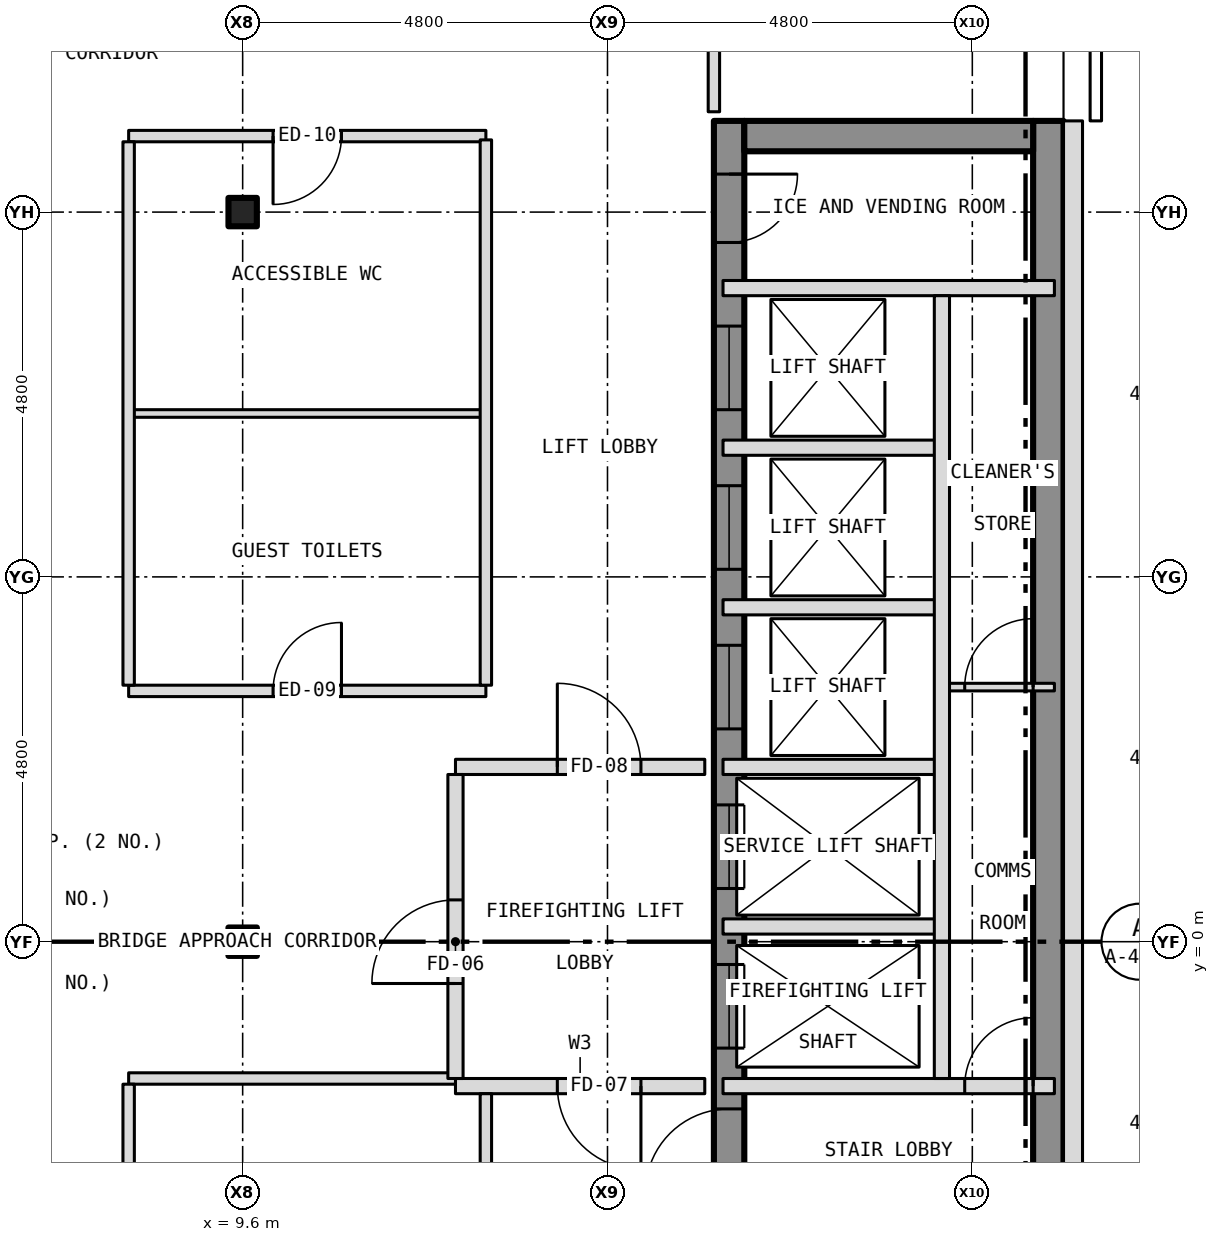
"""IFC4 building model, lengths in metres.
Left out: names, types, materials, properties, quantities, classifications, styles, units other than length and angle.
Written with IfcOpenShell. Run it as: python <this file> out.ifc"""

import sys

from ifc_helpers import new_model, si_unit, direction, frame, frame_2d, origin, origin_2d, place, context, subcontext, project, spatial, rectangle, i_section, extrude, element, fill, save


model = new_model("IFC4")
c1 = context("Model", 3, precision=1e-05, world=origin(), true_north=direction((0.0, 1.0)))
c2 = subcontext(c1, "Body", "Model", "MODEL_VIEW")
j1 = project(units=[si_unit("LENGTHUNIT", "METRE"), si_unit("PLANEANGLEUNIT", "RADIAN")], contexts=[c1])
p1 = place(None, origin())
s1 = spatial("IfcSite", under=j1, at=p1, CompositionType="ELEMENT")
p2 = place(p1, origin())
s2 = spatial("IfcBuilding", under=s1, at=p2, CompositionType="ELEMENT")
p3 = place(p2, frame((0.0, 0.0, 226.0)))
s3 = spatial("IfcBuildingStorey", under=s2, at=p3, CompositionType="ELEMENT", Elevation=226.0)
for number, where, z_axis, x_axis in (
    (1, (9.6, 0.0, -0.15), (0.0, 0.0, 1.0), (1.0, 0.0, 0.0)),
    (2, (9.6, 9.6, -0.15), (0.0, 0.0, 1.0), (1.0, 0.0, 0.0)),
):
    element("IfcColumn", number, at=place(p3, frame(where, z_axis=z_axis, x_axis=x_axis)), inside=s3, PredefinedType="COLUMN", context=c2, shape_type="SweptSolid", body=[
        extrude(i_section(OverallWidth=0.373, OverallDepth=0.373, WebThickness=0.016, FlangeThickness=0.026, at=origin_2d()), origin(), (0.0, 0.0, 1.0), 3.5),
    ])
p4 = place(p3, frame((16.0, -10.8, 0.0), z_axis=(0.0, 0.0, 1.0), x_axis=(0.0, 1.0, 0.0)))
e3 = element("IfcWall", 3, at=p4, inside=s3, PredefinedType="SHEAR", context=c2, shape_type="SweptSolid", body=[
    extrude(rectangle(XDim=21.6, YDim=0.4, at=frame_2d((10.8, 0.0))), origin(), (0.0, 0.0, 1.0), 3.25),
])
p5 = place(p4, frame((9.4, 0.0, 0.0)))
e4 = element("IfcOpeningElement", 4, at=p5, cuts=e3, PredefinedType="OPENING", context=c2, shape_type="SweptSolid", body=[
    extrude(rectangle(XDim=1.1, YDim=2.1, at=frame_2d((0.55, 1.05))), frame((0.0, 0.212, 0.0), z_axis=(0.0, -1.0, 0.0), x_axis=(1.0, 0.0, 0.0)), (0.0, 0.0, 1.0), 0.424),
])
p6 = place(p4, frame((11.5, 0.0, 0.0)))
e5 = element("IfcOpeningElement", 5, at=p6, cuts=e3, PredefinedType="OPENING", context=c2, shape_type="SweptSolid", body=[
    extrude(rectangle(XDim=1.1, YDim=2.1, at=frame_2d((0.55, 1.05))), frame((0.0, 0.212, 0.0), z_axis=(0.0, -1.0, 0.0), x_axis=(1.0, 0.0, 0.0)), (0.0, 0.0, 1.0), 0.424),
])
p7 = place(p4, frame((13.6, 0.0, 0.0)))
e6 = element("IfcOpeningElement", 6, at=p7, cuts=e3, PredefinedType="OPENING", context=c2, shape_type="SweptSolid", body=[
    extrude(rectangle(XDim=1.1, YDim=2.1, at=frame_2d((0.55, 1.05))), frame((0.0, 0.212, 0.0), z_axis=(0.0, -1.0, 0.0), x_axis=(1.0, 0.0, 0.0)), (0.0, 0.0, 1.0), 0.424),
])
p8 = place(p4, frame((15.7, 0.0, 0.0)))
e7 = element("IfcOpeningElement", 7, at=p8, cuts=e3, PredefinedType="OPENING", context=c2, shape_type="SweptSolid", body=[
    extrude(rectangle(XDim=1.1, YDim=2.1, at=frame_2d((0.55, 1.05))), frame((0.0, 0.212, 0.0), z_axis=(0.0, -1.0, 0.0), x_axis=(1.0, 0.0, 0.0)), (0.0, 0.0, 1.0), 0.424),
])
p9 = place(p4, frame((17.8, 0.0, 0.0)))
e8 = element("IfcOpeningElement", 8, at=p9, cuts=e3, PredefinedType="OPENING", context=c2, shape_type="SweptSolid", body=[
    extrude(rectangle(XDim=1.1, YDim=2.1, at=frame_2d((0.55, 1.05))), frame((0.0, 0.212, 0.0), z_axis=(0.0, -1.0, 0.0), x_axis=(1.0, 0.0, 0.0)), (0.0, 0.0, 1.0), 0.424),
])
p10 = place(p4, frame((5.642, 0.0, 0.0)))
e9 = element("IfcOpeningElement", 9, at=p10, cuts=e3, PredefinedType="OPENING", context=c2, shape_type="SweptSolid", body=[
    extrude(rectangle(XDim=1.1, YDim=2.1, at=frame_2d((0.55, 1.05))), frame((0.0, 0.212, 0.0), z_axis=(0.0, -1.0, 0.0), x_axis=(1.0, 0.0, 0.0)), (0.0, 0.0, 1.0), 0.424),
])
p11 = place(p4, frame((7.5, 0.0, 0.0)))
e10 = element("IfcOpeningElement", 10, at=p11, cuts=e3, PredefinedType="OPENING", context=c2, shape_type="SweptSolid", body=[
    extrude(rectangle(XDim=1.1, YDim=2.1, at=frame_2d((0.55, 1.05))), frame((0.0, 0.212, 0.0), z_axis=(0.0, -1.0, 0.0), x_axis=(1.0, 0.0, 0.0)), (0.0, 0.0, 1.0), 0.424),
])
p12 = place(p4, frame((20.0, 0.0, 0.0)))
e11 = element("IfcOpeningElement", 11, at=p12, cuts=e3, PredefinedType="OPENING", context=c2, shape_type="SweptSolid", body=[
    extrude(rectangle(XDim=0.9, YDim=2.1, at=frame_2d((0.45, 1.05))), frame((0.0, 0.212, 0.0), z_axis=(0.0, -1.0, 0.0), x_axis=(1.0, 0.0, 0.0)), (0.0, 0.0, 1.0), 0.424),
])
p13 = place(p3, frame((20.2, -10.8, 0.0), z_axis=(0.0, 0.0, 1.0), x_axis=(0.0, 1.0, 0.0)))
e12 = element("IfcWall", 12, at=p13, inside=s3, PredefinedType="SHEAR", context=c2, shape_type="SweptSolid", body=[
    extrude(rectangle(XDim=21.6, YDim=0.4, at=frame_2d((10.8, 0.0))), origin(), (0.0, 0.0, 1.0), 3.25),
])
p14 = place(p3, frame((16.2, 10.6, 0.0), z_axis=(0.0, 0.0, 1.0), x_axis=(1.0, 0.0, 0.0)))
e13 = element("IfcWall", 13, at=p14, inside=s3, PredefinedType="SHEAR", context=c2, shape_type="SweptSolid", body=[
    extrude(rectangle(XDim=3.8, YDim=0.4, at=frame_2d((1.9, 0.0))), origin(), (0.0, 0.0, 1.0), 3.25),
])
p15 = place(p3, frame((20.525, -10.8, 0.0), z_axis=(0.0, 0.0, 1.0), x_axis=(0.0, 1.0, 0.0)))
e14 = element("IfcWall", 14, at=p15, inside=s3, PredefinedType="SOLIDWALL", context=c2, shape_type="SweptSolid", body=[
    extrude(rectangle(XDim=21.6, YDim=0.25, at=frame_2d((10.8, 0.0))), origin(), (0.0, 0.0, 1.0), 3.5),
])
p16 = place(p15, frame((2.95, 0.0, 1.0)))
e15 = element("IfcOpeningElement", 15, at=p16, cuts=e14, PredefinedType="OPENING", context=c2, shape_type="SweptSolid", body=[
    extrude(rectangle(XDim=0.6, YDim=1.5, at=frame_2d((0.3, 0.75))), frame((0.0, 0.137, 0.0), z_axis=(0.0, -1.0, 0.0), x_axis=(1.0, 0.0, 0.0)), (0.0, 0.0, 1.0), 0.274),
])
p17 = place(p3, frame((12.4, -1.9, 0.0), z_axis=(0.0, 0.0, 1.0), x_axis=(1.0, 0.0, 0.0)))
e16 = element("IfcWall", 16, at=p17, inside=s3, PredefinedType="PARTITIONING", context=c2, shape_type="SweptSolid", body=[
    extrude(rectangle(XDim=3.28, YDim=0.2, at=frame_2d((1.64, 0.0))), origin(), (0.0, 0.0, 1.0), 3.35),
])
p18 = place(p17, frame((1.34, 0.0, 0.0)))
e17 = element("IfcOpeningElement", 17, at=p18, cuts=e16, PredefinedType="OPENING", context=c2, shape_type="SweptSolid", body=[
    extrude(rectangle(XDim=1.1, YDim=2.1, at=frame_2d((0.55, 1.05))), frame((0.0, 0.112, 0.0), z_axis=(0.0, -1.0, 0.0), x_axis=(1.0, 0.0, 0.0)), (0.0, 0.0, 1.0), 0.224),
])
p19 = place(p3, frame((15.92, -1.9, 0.0), z_axis=(0.0, 0.0, 1.0), x_axis=(1.0, 0.0, 0.0)))
e18 = element("IfcWall", 18, at=p19, inside=s3, PredefinedType="PARTITIONING", context=c2, shape_type="SweptSolid", body=[
    extrude(rectangle(XDim=4.36, YDim=0.2, at=frame_2d((2.18, 0.0))), origin(), (0.0, 0.0, 1.0), 3.25),
])
p20 = place(p19, frame((3.18, 0.0, 0.0)))
e19 = element("IfcOpeningElement", 19, at=p20, cuts=e18, PredefinedType="OPENING", context=c2, shape_type="SweptSolid", body=[
    extrude(rectangle(XDim=0.9, YDim=2.1, at=frame_2d((0.45, 1.05))), frame((0.0, 0.112, 0.0), z_axis=(0.0, -1.0, 0.0), x_axis=(1.0, 0.0, 0.0)), (0.0, 0.0, 1.0), 0.224),
])
p21 = place(p3, frame((8.1, -1.8, 0.0), z_axis=(0.0, 0.0, 1.0), x_axis=(1.0, 0.0, 0.0)))
e20 = element("IfcWall", 20, at=p21, inside=s3, PredefinedType="PARTITIONING", context=c2, shape_type="SweptSolid", body=[
    extrude(rectangle(XDim=4.3, YDim=0.15, at=frame_2d((2.15, 0.0))), origin(), (0.0, 0.0, 1.0), 3.35),
])
p22 = place(p3, frame((15.92, 0.2, 0.0), z_axis=(0.0, 0.0, 1.0), x_axis=(1.0, 0.0, 0.0)))
e21 = element("IfcWall", 21, at=p22, inside=s3, PredefinedType="PARTITIONING", context=c2, shape_type="SweptSolid", body=[
    extrude(rectangle(XDim=2.88, YDim=0.2, at=frame_2d((1.44, 0.0))), origin(), (0.0, 0.0, 1.0), 3.25),
])
p23 = place(p3, frame((12.4, 2.3, 0.0), z_axis=(0.0, 0.0, 1.0), x_axis=(1.0, 0.0, 0.0)))
e22 = element("IfcWall", 22, at=p23, inside=s3, PredefinedType="PARTITIONING", context=c2, shape_type="SweptSolid", body=[
    extrude(rectangle(XDim=3.28, YDim=0.2, at=frame_2d((1.64, 0.0))), origin(), (0.0, 0.0, 1.0), 3.35),
])
p24 = place(p23, frame((1.34, 0.0, 0.0)))
e23 = element("IfcOpeningElement", 23, at=p24, cuts=e22, PredefinedType="OPENING", context=c2, shape_type="SweptSolid", body=[
    extrude(rectangle(XDim=1.1, YDim=2.1, at=frame_2d((0.55, 1.05))), frame((0.0, 0.112, 0.0), z_axis=(0.0, -1.0, 0.0), x_axis=(1.0, 0.0, 0.0)), (0.0, 0.0, 1.0), 0.224),
])
p25 = place(p3, frame((15.92, 2.3, 0.0), z_axis=(0.0, 0.0, 1.0), x_axis=(1.0, 0.0, 0.0)))
e24 = element("IfcWall", 24, at=p25, inside=s3, PredefinedType="PARTITIONING", context=c2, shape_type="SweptSolid", body=[
    extrude(rectangle(XDim=2.88, YDim=0.2, at=frame_2d((1.44, 0.0))), origin(), (0.0, 0.0, 1.0), 3.25),
])
p26 = place(p3, frame((8.1, 3.3, 0.0), z_axis=(0.0, 0.0, 1.0), x_axis=(1.0, 0.0, 0.0)))
e25 = element("IfcWall", 25, at=p26, inside=s3, PredefinedType="PARTITIONING", context=c2, shape_type="SweptSolid", body=[
    extrude(rectangle(XDim=4.7, YDim=0.15, at=frame_2d((2.35, 0.0))), origin(), (0.0, 0.0, 1.0), 3.35),
])
p27 = place(p26, frame((1.9, 0.0, 0.0)))
e26 = element("IfcOpeningElement", 26, at=p27, cuts=e25, PredefinedType="OPENING", context=c2, shape_type="SweptSolid", body=[
    extrude(rectangle(XDim=0.9, YDim=2.1, at=frame_2d((0.45, 1.05))), frame((0.0, 0.087, 0.0), z_axis=(0.0, -1.0, 0.0), x_axis=(1.0, 0.0, 0.0)), (0.0, 0.0, 1.0), 0.174),
])
p28 = place(p3, frame((18.8, 3.35, 0.0), z_axis=(0.0, 0.0, 1.0), x_axis=(1.0, 0.0, 0.0)))
e27 = element("IfcWall", 27, at=p28, inside=s3, PredefinedType="PARTITIONING", context=c2, shape_type="SweptSolid", body=[
    extrude(rectangle(XDim=1.48, YDim=0.1, at=frame_2d((0.74, 0.0))), origin(), (0.0, 0.0, 1.0), 3.25),
])
p29 = place(p28, frame((0.3, 0.0, 0.0)))
e28 = element("IfcOpeningElement", 28, at=p29, cuts=e27, PredefinedType="OPENING", context=c2, shape_type="SweptSolid", body=[
    extrude(rectangle(XDim=0.9, YDim=2.1, at=frame_2d((0.45, 1.05))), frame((0.0, 0.062, 0.0), z_axis=(0.0, -1.0, 0.0), x_axis=(1.0, 0.0, 0.0)), (0.0, 0.0, 1.0), 0.124),
])
for number, where, z_axis, x_axis in (
    (29, (15.92, 4.4, 0.0), (0.0, 0.0, 1.0), (1.0, 0.0, 0.0)),
    (30, (15.92, 6.5, 0.0), (0.0, 0.0, 1.0), (1.0, 0.0, 0.0)),
):
    element("IfcWall", number, at=place(p3, frame(where, z_axis=z_axis, x_axis=x_axis)), inside=s3, PredefinedType="PARTITIONING", context=c2, shape_type="SweptSolid", body=[
        extrude(rectangle(XDim=2.88, YDim=0.2, at=frame_2d((1.44, 0.0))), origin(), (0.0, 0.0, 1.0), 3.25),
    ])
p30 = place(p3, frame((8.1, 6.95, 0.0), z_axis=(0.0, 0.0, 1.0), x_axis=(1.0, 0.0, 0.0)))
e31 = element("IfcWall", 31, at=p30, inside=s3, PredefinedType="PARTITIONING", context=c2, shape_type="SweptSolid", body=[
    extrude(rectangle(XDim=4.7, YDim=0.1, at=frame_2d((2.35, 0.0))), origin(), (0.0, 0.0, 1.0), 3.35),
])
p31 = place(p3, frame((15.92, 8.6, 0.0), z_axis=(0.0, 0.0, 1.0), x_axis=(1.0, 0.0, 0.0)))
e32 = element("IfcWall", 32, at=p31, inside=s3, PredefinedType="PARTITIONING", context=c2, shape_type="SweptSolid", body=[
    extrude(rectangle(XDim=4.36, YDim=0.2, at=frame_2d((2.18, 0.0))), origin(), (0.0, 0.0, 1.0), 3.25),
])
p32 = place(p3, frame((8.1, 10.6, 0.0), z_axis=(0.0, 0.0, 1.0), x_axis=(1.0, 0.0, 0.0)))
e33 = element("IfcWall", 33, at=p32, inside=s3, PredefinedType="PARTITIONING", context=c2, shape_type="SweptSolid", body=[
    extrude(rectangle(XDim=4.7, YDim=0.15, at=frame_2d((2.35, 0.0))), origin(), (0.0, 0.0, 1.0), 3.35),
])
p33 = place(p32, frame((1.9, 0.0, 0.0)))
e34 = element("IfcOpeningElement", 34, at=p33, cuts=e33, PredefinedType="OPENING", context=c2, shape_type="SweptSolid", body=[
    extrude(rectangle(XDim=0.9, YDim=2.1, at=frame_2d((0.45, 1.05))), frame((0.0, 0.087, 0.0), z_axis=(0.0, -1.0, 0.0), x_axis=(1.0, 0.0, 0.0)), (0.0, 0.0, 1.0), 0.174),
])
p34 = place(p3, frame((8.1, -10.525, 0.0), z_axis=(0.0, 0.0, 1.0), x_axis=(0.0, 1.0, 0.0)))
e35 = element("IfcWall", 35, at=p34, inside=s3, PredefinedType="PARTITIONING", context=c2, shape_type="SweptSolid", body=[
    extrude(rectangle(XDim=8.65, YDim=0.15, at=frame_2d((4.325, 0.0))), origin(), (0.0, 0.0, 1.0), 3.35),
])
p35 = place(p34, frame((3.875, 0.0, 0.0)))
e36 = element("IfcOpeningElement", 36, at=p35, cuts=e35, PredefinedType="OPENING", context=c2, shape_type="SweptSolid", body=[
    extrude(rectangle(XDim=0.9, YDim=2.1, at=frame_2d((0.45, 1.05))), frame((0.0, 0.087, 0.0), z_axis=(0.0, -1.0, 0.0), x_axis=(1.0, 0.0, 0.0)), (0.0, 0.0, 1.0), 0.174),
])
p36 = place(p3, frame((8.1, 3.375, 0.0), z_axis=(0.0, 0.0, 1.0), x_axis=(0.0, 1.0, 0.0)))
e37 = element("IfcWall", 37, at=p36, inside=s3, PredefinedType="PARTITIONING", context=c2, shape_type="SweptSolid", body=[
    extrude(rectangle(XDim=7.15, YDim=0.15, at=frame_2d((3.575, 0.0))), origin(), (0.0, 0.0, 1.0), 3.35),
])
p37 = place(p3, frame((12.4, -1.8, 0.0), z_axis=(0.0, 0.0, 1.0), x_axis=(0.0, 1.0, 0.0)))
e38 = element("IfcWall", 38, at=p37, inside=s3, PredefinedType="PARTITIONING", context=c2, shape_type="SweptSolid", body=[
    extrude(rectangle(XDim=4.0, YDim=0.2, at=frame_2d((2.0, 0.0))), origin(), (0.0, 0.0, 1.0), 3.35),
])
p38 = place(p37, frame((1.25, 0.0, 0.0)))
e39 = element("IfcOpeningElement", 39, at=p38, cuts=e38, PredefinedType="OPENING", context=c2, shape_type="SweptSolid", body=[
    extrude(rectangle(XDim=1.1, YDim=2.1, at=frame_2d((0.55, 1.05))), frame((0.0, 0.112, 0.0), z_axis=(0.0, -1.0, 0.0), x_axis=(1.0, 0.0, 0.0)), (0.0, 0.0, 1.0), 0.224),
])
p39 = place(p3, frame((12.8, -10.525, 0.0), z_axis=(0.0, 0.0, 1.0), x_axis=(0.0, 1.0, 0.0)))
e40 = element("IfcWall", 40, at=p39, inside=s3, PredefinedType="PARTITIONING", context=c2, shape_type="SweptSolid", body=[
    extrude(rectangle(XDim=8.525, YDim=0.15, at=frame_2d((4.262, 0.0))), origin(), (0.0, 0.0, 1.0), 3.35),
])
p40 = place(p3, frame((12.8, 3.375, 0.0), z_axis=(0.0, 0.0, 1.0), x_axis=(0.0, 1.0, 0.0)))
e41 = element("IfcWall", 41, at=p40, inside=s3, PredefinedType="PARTITIONING", context=c2, shape_type="SweptSolid", body=[
    extrude(rectangle(XDim=7.175, YDim=0.15, at=frame_2d((3.587, 0.0))), origin(), (0.0, 0.0, 1.0), 3.35),
])
p41 = place(p3, frame((15.8, 10.92, 0.0), z_axis=(0.0, 0.0, 1.0), x_axis=(0.0, 1.0, 0.0)))
e42 = element("IfcWall", 42, at=p41, inside=s3, PredefinedType="PARTITIONING", context=c2, shape_type="SweptSolid", body=[
    extrude(rectangle(XDim=1.805, YDim=0.15, at=frame_2d((0.903, 0.0))), origin(), (0.0, 0.0, 1.0), 3.35),
])
p42 = place(p3, frame((18.8, -1.8, 0.0), z_axis=(0.0, 0.0, 1.0), x_axis=(0.0, 1.0, 0.0)))
e43 = element("IfcWall", 43, at=p42, inside=s3, PredefinedType="PARTITIONING", context=c2, shape_type="SweptSolid", body=[
    extrude(rectangle(XDim=10.3, YDim=0.2, at=frame_2d((5.15, 0.0))), origin(), (0.0, 0.0, 1.0), 3.25),
])
p43 = place(p5, origin())
e44 = element("IfcDoor", 44, at=p43, inside=s3, OperationType="SLIDING_TO_LEFT", PredefinedType="DOOR", context=c2, shape_type="SweptSolid", body=[
    extrude(rectangle(XDim=1.1, YDim=2.1, at=frame_2d((0.55, 1.05))), frame((0.0, 0.025, 0.0), z_axis=(0.0, -1.0, 0.0), x_axis=(1.0, 0.0, 0.0)), (0.0, 0.0, 1.0), 0.05),
])
fill(e4, e44)
p44 = place(p6, origin())
e45 = element("IfcDoor", 45, at=p44, inside=s3, OperationType="SLIDING_TO_LEFT", PredefinedType="DOOR", context=c2, shape_type="SweptSolid", body=[
    extrude(rectangle(XDim=1.1, YDim=2.1, at=frame_2d((0.55, 1.05))), frame((0.0, 0.025, 0.0), z_axis=(0.0, -1.0, 0.0), x_axis=(1.0, 0.0, 0.0)), (0.0, 0.0, 1.0), 0.05),
])
fill(e5, e45)
p45 = place(p7, origin())
e46 = element("IfcDoor", 46, at=p45, inside=s3, OperationType="SLIDING_TO_LEFT", PredefinedType="DOOR", context=c2, shape_type="SweptSolid", body=[
    extrude(rectangle(XDim=1.1, YDim=2.1, at=frame_2d((0.55, 1.05))), frame((0.0, 0.025, 0.0), z_axis=(0.0, -1.0, 0.0), x_axis=(1.0, 0.0, 0.0)), (0.0, 0.0, 1.0), 0.05),
])
fill(e6, e46)
p46 = place(p8, origin())
e47 = element("IfcDoor", 47, at=p46, inside=s3, OperationType="SLIDING_TO_LEFT", PredefinedType="DOOR", context=c2, shape_type="SweptSolid", body=[
    extrude(rectangle(XDim=1.1, YDim=2.1, at=frame_2d((0.55, 1.05))), frame((0.0, 0.025, 0.0), z_axis=(0.0, -1.0, 0.0), x_axis=(1.0, 0.0, 0.0)), (0.0, 0.0, 1.0), 0.05),
])
fill(e7, e47)
p47 = place(p9, origin())
e48 = element("IfcDoor", 48, at=p47, inside=s3, OperationType="SLIDING_TO_LEFT", PredefinedType="DOOR", context=c2, shape_type="SweptSolid", body=[
    extrude(rectangle(XDim=1.1, YDim=2.1, at=frame_2d((0.55, 1.05))), frame((0.0, 0.025, 0.0), z_axis=(0.0, -1.0, 0.0), x_axis=(1.0, 0.0, 0.0)), (0.0, 0.0, 1.0), 0.05),
])
fill(e8, e48)
p48 = place(p11, origin())
e49 = element("IfcDoor", 49, at=p48, inside=s3, OperationType="SINGLE_SWING_LEFT", PredefinedType="DOOR", context=c2, shape_type="SweptSolid", body=[
    extrude(rectangle(XDim=1.1, YDim=2.1, at=frame_2d((0.55, 1.05))), frame((0.0, 0.025, 0.0), z_axis=(0.0, -1.0, 0.0), x_axis=(1.0, 0.0, 0.0)), (0.0, 0.0, 1.0), 0.05),
])
fill(e10, e49)
p49 = place(p12, origin())
e50 = element("IfcDoor", 50, at=p49, inside=s3, OperationType="SINGLE_SWING_RIGHT", PredefinedType="DOOR", context=c2, shape_type="SweptSolid", body=[
    extrude(rectangle(XDim=0.9, YDim=2.1, at=frame_2d((0.45, 1.05))), frame((0.0, 0.025, 0.0), z_axis=(0.0, -1.0, 0.0), x_axis=(1.0, 0.0, 0.0)), (0.0, 0.0, 1.0), 0.05),
])
fill(e11, e50)
p50 = place(p20, origin())
e51 = element("IfcDoor", 51, at=p50, inside=s3, OperationType="SINGLE_SWING_RIGHT", PredefinedType="DOOR", context=c2, shape_type="SweptSolid", body=[
    extrude(rectangle(XDim=0.9, YDim=2.1, at=frame_2d((0.45, 1.05))), frame((0.0, 0.025, 0.0), z_axis=(0.0, -1.0, 0.0), x_axis=(1.0, 0.0, 0.0)), (0.0, 0.0, 1.0), 0.05),
])
fill(e19, e51)
p51 = place(p29, origin())
e52 = element("IfcDoor", 52, at=p51, inside=s3, OperationType="SINGLE_SWING_RIGHT", PredefinedType="DOOR", context=c2, shape_type="SweptSolid", body=[
    extrude(rectangle(XDim=0.9, YDim=2.1, at=frame_2d((0.45, 1.05))), frame((0.0, 0.025, 0.0), z_axis=(0.0, -1.0, 0.0), x_axis=(1.0, 0.0, 0.0)), (0.0, 0.0, 1.0), 0.05),
])
fill(e28, e52)
p52 = place(p38, origin())
e53 = element("IfcDoor", 53, at=p52, inside=s3, OperationType="SINGLE_SWING_LEFT", PredefinedType="DOOR", context=c2, shape_type="SweptSolid", body=[
    extrude(rectangle(XDim=1.1, YDim=2.1, at=frame_2d((0.55, 1.05))), frame((0.0, 0.025, 0.0), z_axis=(0.0, -1.0, 0.0), x_axis=(1.0, 0.0, 0.0)), (0.0, 0.0, 1.0), 0.05),
])
fill(e39, e53)
p53 = place(p18, origin())
e54 = element("IfcDoor", 54, at=p53, inside=s3, OperationType="SINGLE_SWING_RIGHT", PredefinedType="DOOR", context=c2, shape_type="SweptSolid", body=[
    extrude(rectangle(XDim=1.1, YDim=2.1, at=frame_2d((0.55, 1.05))), frame((0.0, 0.025, 0.0), z_axis=(0.0, -1.0, 0.0), x_axis=(1.0, 0.0, 0.0)), (0.0, 0.0, 1.0), 0.05),
])
fill(e17, e54)
p54 = place(p24, origin())
e55 = element("IfcDoor", 55, at=p54, inside=s3, OperationType="SINGLE_SWING_LEFT", PredefinedType="DOOR", context=c2, shape_type="SweptSolid", body=[
    extrude(rectangle(XDim=1.1, YDim=2.1, at=frame_2d((0.55, 1.05))), frame((0.0, 0.025, 0.0), z_axis=(0.0, -1.0, 0.0), x_axis=(1.0, 0.0, 0.0)), (0.0, 0.0, 1.0), 0.05),
])
fill(e23, e55)
p55 = place(p27, origin())
e56 = element("IfcDoor", 56, at=p55, inside=s3, OperationType="SINGLE_SWING_RIGHT", PredefinedType="DOOR", context=c2, shape_type="SweptSolid", body=[
    extrude(rectangle(XDim=0.9, YDim=2.1, at=frame_2d((0.45, 1.05))), frame((0.0, 0.025, 0.0), z_axis=(0.0, -1.0, 0.0), x_axis=(1.0, 0.0, 0.0)), (0.0, 0.0, 1.0), 0.05),
])
fill(e26, e56)
p56 = place(p33, origin())
e57 = element("IfcDoor", 57, at=p56, inside=s3, OperationType="SINGLE_SWING_LEFT", PredefinedType="DOOR", context=c2, shape_type="SweptSolid", body=[
    extrude(rectangle(XDim=0.9, YDim=2.1, at=frame_2d((0.45, 1.05))), frame((0.0, 0.025, 0.0), z_axis=(0.0, -1.0, 0.0), x_axis=(1.0, 0.0, 0.0)), (0.0, 0.0, 1.0), 0.05),
])
fill(e34, e57)
save(model, sys.argv[1])
